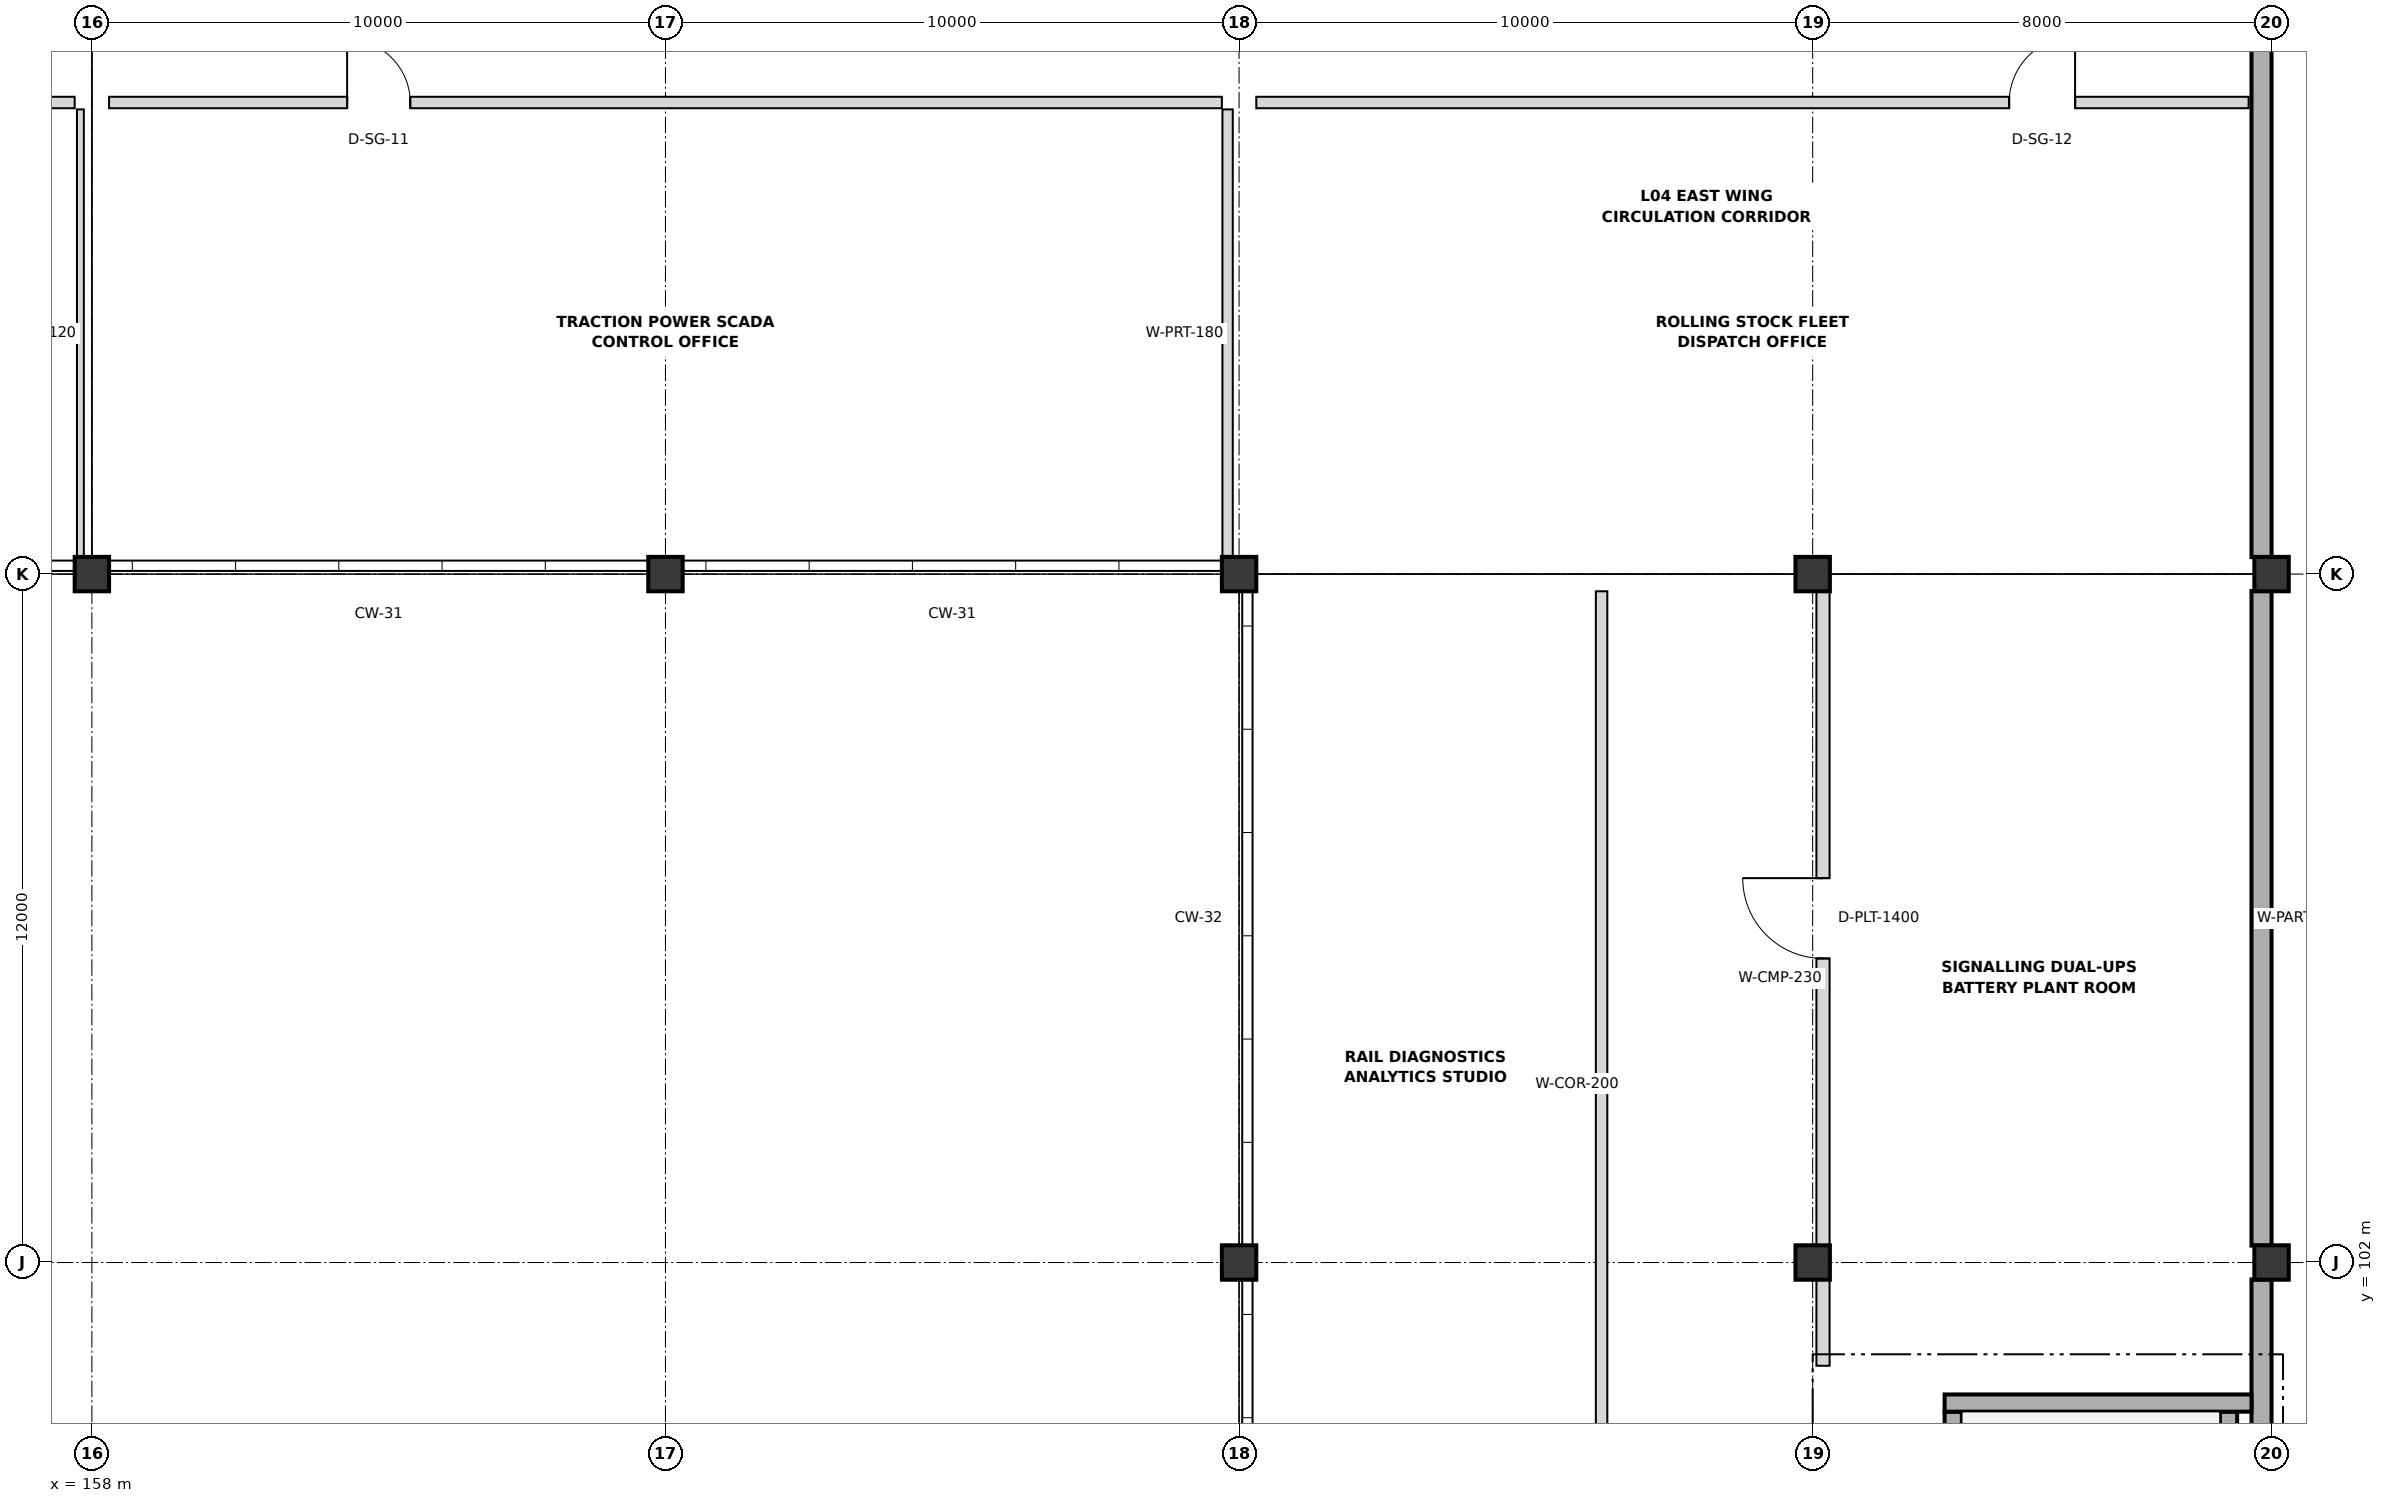
"""IFC4 building model, lengths in metres.
Left out: names, types, materials, properties, quantities, classifications, styles, units other than length and angle.
Written with IfcOpenShell. Run it as: python <this file> out.ifc"""

import sys

from ifc_helpers import new_model, si_unit, direction, frame, frame_2d, origin, origin_2d, place, context, subcontext, project, spatial, rectangle, extrude, element, fill, save


model = new_model("IFC4")
c1 = context("Model", 3, precision=1e-05, world=origin(), true_north=direction((0.0, 1.0)))
c2 = subcontext(c1, "Body", "Model", "MODEL_VIEW")
j1 = project(units=[si_unit("LENGTHUNIT", "METRE"), si_unit("PLANEANGLEUNIT", "RADIAN")], contexts=[c1])
p1 = place(None, origin())
s1 = spatial("IfcSite", under=j1, at=p1, CompositionType="ELEMENT")
p2 = place(p1, origin())
s2 = spatial("IfcBuilding", under=s1, at=p2, CompositionType="ELEMENT")
p3 = place(p2, frame((0.0, 0.0, 18.6)))
s3 = spatial("IfcBuildingStorey", under=s2, at=p3, CompositionType="ELEMENT", Elevation=18.6)
for number, where, z_axis, x_axis in (
    (1, (158.0, 114.0, 0.0), (0.0, 0.0, 1.0), (1.0, 0.0, 0.0)),
    (2, (168.0, 114.0, 0.0), (0.0, 0.0, 1.0), (1.0, 0.0, 0.0)),
    (3, (178.0, 102.0, 0.0), (0.0, 0.0, 1.0), (1.0, 0.0, 0.0)),
    (4, (178.0, 114.0, 0.0), (0.0, 0.0, 1.0), (1.0, 0.0, 0.0)),
    (5, (188.0, 102.0, 0.0), (0.0, 0.0, 1.0), (1.0, 0.0, 0.0)),
    (6, (188.0, 114.0, 0.0), (0.0, 0.0, 1.0), (1.0, 0.0, 0.0)),
    (7, (196.0, 102.0, 0.0), (0.0, 0.0, 1.0), (1.0, 0.0, 0.0)),
    (8, (196.0, 114.0, 0.0), (0.0, 0.0, 1.0), (1.0, 0.0, 0.0)),
):
    element("IfcColumn", number, at=place(p3, frame(where, z_axis=z_axis, x_axis=x_axis)), inside=s3, PredefinedType="COLUMN", context=c2, shape_type="SweptSolid", body=[
        extrude(rectangle(XDim=0.6, YDim=0.6, at=origin_2d()), origin(), (0.0, 0.0, 1.0), 4.2),
    ])
for number, where, z_axis, x_axis in (
    (9, (195.825, 101.705, 0.0), (0.0, 0.0, 1.0), (0.0, -1.0, 0.0)),
    (10, (195.825, 113.705, 0.0), (0.0, 0.0, 1.0), (0.0, -1.0, 0.0)),
    (11, (195.825, 125.705, 0.0), (0.0, 0.0, 1.0), (0.0, -1.0, 0.0)),
):
    element("IfcWall", number, at=place(p3, frame(where, z_axis=z_axis, x_axis=x_axis)), inside=s3, PredefinedType="SOLIDWALL", context=c2, shape_type="SweptSolid", body=[
        extrude(rectangle(XDim=11.41, YDim=0.35, at=frame_2d((5.705, 0.0))), origin(), (0.0, 0.0, 1.0), 4.2),
    ])
for number, where, z_axis, x_axis in (
    (12, (190.45, 90.8, 0.0), (0.0, 0.0, 1.0), (0.0, 1.0, 0.0)),
    (13, (195.25, 99.4, 0.0), (0.0, 0.0, 1.0), (0.0, -1.0, 0.0)),
):
    element("IfcWall", number, at=place(p3, frame(where, z_axis=z_axis, x_axis=x_axis)), inside=s3, PredefinedType="SHEAR", context=c2, shape_type="SweptSolid", body=[
        extrude(rectangle(XDim=8.6, YDim=0.3, at=frame_2d((4.3, 0.0))), origin(), (0.0, 0.0, 1.0), 4.2),
    ])
p4 = place(p3, frame((190.3, 99.55, 0.0), z_axis=(0.0, 0.0, 1.0), x_axis=(1.0, 0.0, 0.0)))
e14 = element("IfcWall", 14, at=p4, inside=s3, PredefinedType="SHEAR", context=c2, shape_type="SweptSolid", body=[
    extrude(rectangle(XDim=5.35, YDim=0.3, at=frame_2d((2.675, 0.0))), origin(), (0.0, 0.0, 1.0), 4.2),
])
p5 = place(p3, frame((118.4, 122.22, 0.0), z_axis=(0.0, 0.0, 1.0), x_axis=(1.0, 0.0, 0.0)))
e15 = element("IfcWall", 15, at=p5, inside=s3, PredefinedType="PARTITIONING", context=c2, shape_type="SweptSolid", body=[
    extrude(rectangle(XDim=39.3, YDim=0.2, at=frame_2d((19.65, 0.0))), origin(), (0.0, 0.0, 1.0), 3.188),
])
p6 = place(p5, frame((13.65, 0.0, 0.0)))
e16 = element("IfcOpeningElement", 16, at=p6, cuts=e15, PredefinedType="OPENING", context=c2, shape_type="SweptSolid", body=[
    extrude(rectangle(XDim=1.9, YDim=2.25, at=frame_2d((0.95, 1.125))), frame((0.0, 0.11, 0.0), z_axis=(0.0, -1.0, 0.0), x_axis=(1.0, 0.0, 0.0)), (0.0, 0.0, 1.0), 0.22),
])
p7 = place(p3, frame((157.8, 114.3, 0.0), z_axis=(0.0, 0.0, 1.0), x_axis=(0.0, 1.0, 0.0)))
e17 = element("IfcWall", 17, at=p7, inside=s3, PredefinedType="PARTITIONING", context=c2, shape_type="SweptSolid", body=[
    extrude(rectangle(XDim=7.8, YDim=0.12, at=frame_2d((3.9, 0.0))), origin(), (0.0, 0.0, 1.0), 3.188),
])
p8 = place(p3, frame((158.3, 122.22, 0.0), z_axis=(0.0, 0.0, 1.0), x_axis=(1.0, 0.0, 0.0)))
e18 = element("IfcWall", 18, at=p8, inside=s3, PredefinedType="PARTITIONING", context=c2, shape_type="SweptSolid", body=[
    extrude(rectangle(XDim=19.4, YDim=0.2, at=frame_2d((9.7, 0.0))), origin(), (0.0, 0.0, 1.0), 3.188),
])
p9 = place(p8, frame((4.15, 0.0, 0.0)))
e19 = element("IfcOpeningElement", 19, at=p9, cuts=e18, PredefinedType="OPENING", context=c2, shape_type="SweptSolid", body=[
    extrude(rectangle(XDim=1.1, YDim=2.2, at=frame_2d((0.55, 1.1))), frame((0.0, 0.11, 0.0), z_axis=(0.0, -1.0, 0.0), x_axis=(1.0, 0.0, 0.0)), (0.0, 0.0, 1.0), 0.22),
])
p10 = place(p3, frame((177.8, 114.3, 0.0), z_axis=(0.0, 0.0, 1.0), x_axis=(0.0, 1.0, 0.0)))
e20 = element("IfcWall", 20, at=p10, inside=s3, PredefinedType="PARTITIONING", context=c2, shape_type="SweptSolid", body=[
    extrude(rectangle(XDim=7.8, YDim=0.18, at=frame_2d((3.9, 0.0))), origin(), (0.0, 0.0, 1.0), 3.188),
])
p11 = place(p3, frame((178.3, 122.22, 0.0), z_axis=(0.0, 0.0, 1.0), x_axis=(1.0, 0.0, 0.0)))
e21 = element("IfcWall", 21, at=p11, inside=s3, PredefinedType="PARTITIONING", context=c2, shape_type="SweptSolid", body=[
    extrude(rectangle(XDim=17.3, YDim=0.2, at=frame_2d((8.65, 0.0))), origin(), (0.0, 0.0, 1.0), 3.188),
])
p12 = place(p11, frame((13.125, 0.0, 0.0)))
e22 = element("IfcOpeningElement", 22, at=p12, cuts=e21, PredefinedType="OPENING", context=c2, shape_type="SweptSolid", body=[
    extrude(rectangle(XDim=1.15, YDim=2.2, at=frame_2d((0.575, 1.1))), frame((0.0, 0.11, 0.0), z_axis=(0.0, -1.0, 0.0), x_axis=(1.0, 0.0, 0.0)), (0.0, 0.0, 1.0), 0.22),
])
p13 = place(p3, frame((184.32, 78.3, 0.0), z_axis=(0.0, 0.0, 1.0), x_axis=(0.0, 1.0, 0.0)))
e23 = element("IfcWall", 23, at=p13, inside=s3, PredefinedType="PARTITIONING", context=c2, shape_type="SweptSolid", body=[
    extrude(rectangle(XDim=35.4, YDim=0.2, at=frame_2d((17.7, 0.0))), origin(), (0.0, 0.0, 1.0), 3.288),
])
p14 = place(p13, frame((17.175, 0.0, 0.0)))
e24 = element("IfcOpeningElement", 24, at=p14, cuts=e23, PredefinedType="OPENING", context=c2, shape_type="SweptSolid", body=[
    extrude(rectangle(XDim=1.05, YDim=2.1, at=frame_2d((0.525, 1.05))), frame((0.0, 0.11, 0.0), z_axis=(0.0, -1.0, 0.0), x_axis=(1.0, 0.0, 0.0)), (0.0, 0.0, 1.0), 0.22),
])
p15 = place(p3, frame((188.18, 100.2, 0.0), z_axis=(0.0, 0.0, 1.0), x_axis=(0.0, 1.0, 0.0)))
e25 = element("IfcWall", 25, at=p15, inside=s3, PredefinedType="PARTITIONING", context=c2, shape_type="SweptSolid", body=[
    extrude(rectangle(XDim=13.5, YDim=0.23, at=frame_2d((6.75, 0.0))), origin(), (0.0, 0.0, 1.0), 3.188),
])
p16 = place(p15, frame((7.1, 0.0, 0.0)))
e26 = element("IfcOpeningElement", 26, at=p16, cuts=e25, PredefinedType="OPENING", context=c2, shape_type="SweptSolid", body=[
    extrude(rectangle(XDim=1.4, YDim=2.2, at=frame_2d((0.7, 1.1))), frame((0.0, 0.125, 0.0), z_axis=(0.0, -1.0, 0.0), x_axis=(1.0, 0.0, 0.0)), (0.0, 0.0, 1.0), 0.25),
])
p17 = place(p9, origin())
e27 = element("IfcDoor", 27, at=p17, inside=s3, OperationType="SINGLE_SWING_LEFT", PredefinedType="DOOR", context=c2, shape_type="SweptSolid", body=[
    extrude(rectangle(XDim=1.1, YDim=2.2, at=frame_2d((0.55, 1.1))), frame((0.0, 0.025, 0.0), z_axis=(0.0, -1.0, 0.0), x_axis=(1.0, 0.0, 0.0)), (0.0, 0.0, 1.0), 0.05),
])
fill(e19, e27)
p18 = place(p12, origin())
e28 = element("IfcDoor", 28, at=p18, inside=s3, OperationType="SINGLE_SWING_RIGHT", PredefinedType="DOOR", context=c2, shape_type="SweptSolid", body=[
    extrude(rectangle(XDim=1.15, YDim=2.2, at=frame_2d((0.575, 1.1))), frame((0.0, 0.025, 0.0), z_axis=(0.0, -1.0, 0.0), x_axis=(1.0, 0.0, 0.0)), (0.0, 0.0, 1.0), 0.05),
])
fill(e22, e28)
p19 = place(p16, origin())
e29 = element("IfcDoor", 29, at=p19, inside=s3, OperationType="SINGLE_SWING_RIGHT", PredefinedType="DOOR", context=c2, shape_type="SweptSolid", body=[
    extrude(rectangle(XDim=1.4, YDim=2.2, at=frame_2d((0.7, 1.1))), frame((0.0, 0.025, 0.0), z_axis=(0.0, -1.0, 0.0), x_axis=(1.0, 0.0, 0.0)), (0.0, 0.0, 1.0), 0.05),
])
fill(e26, e29)
save(model, sys.argv[1])
